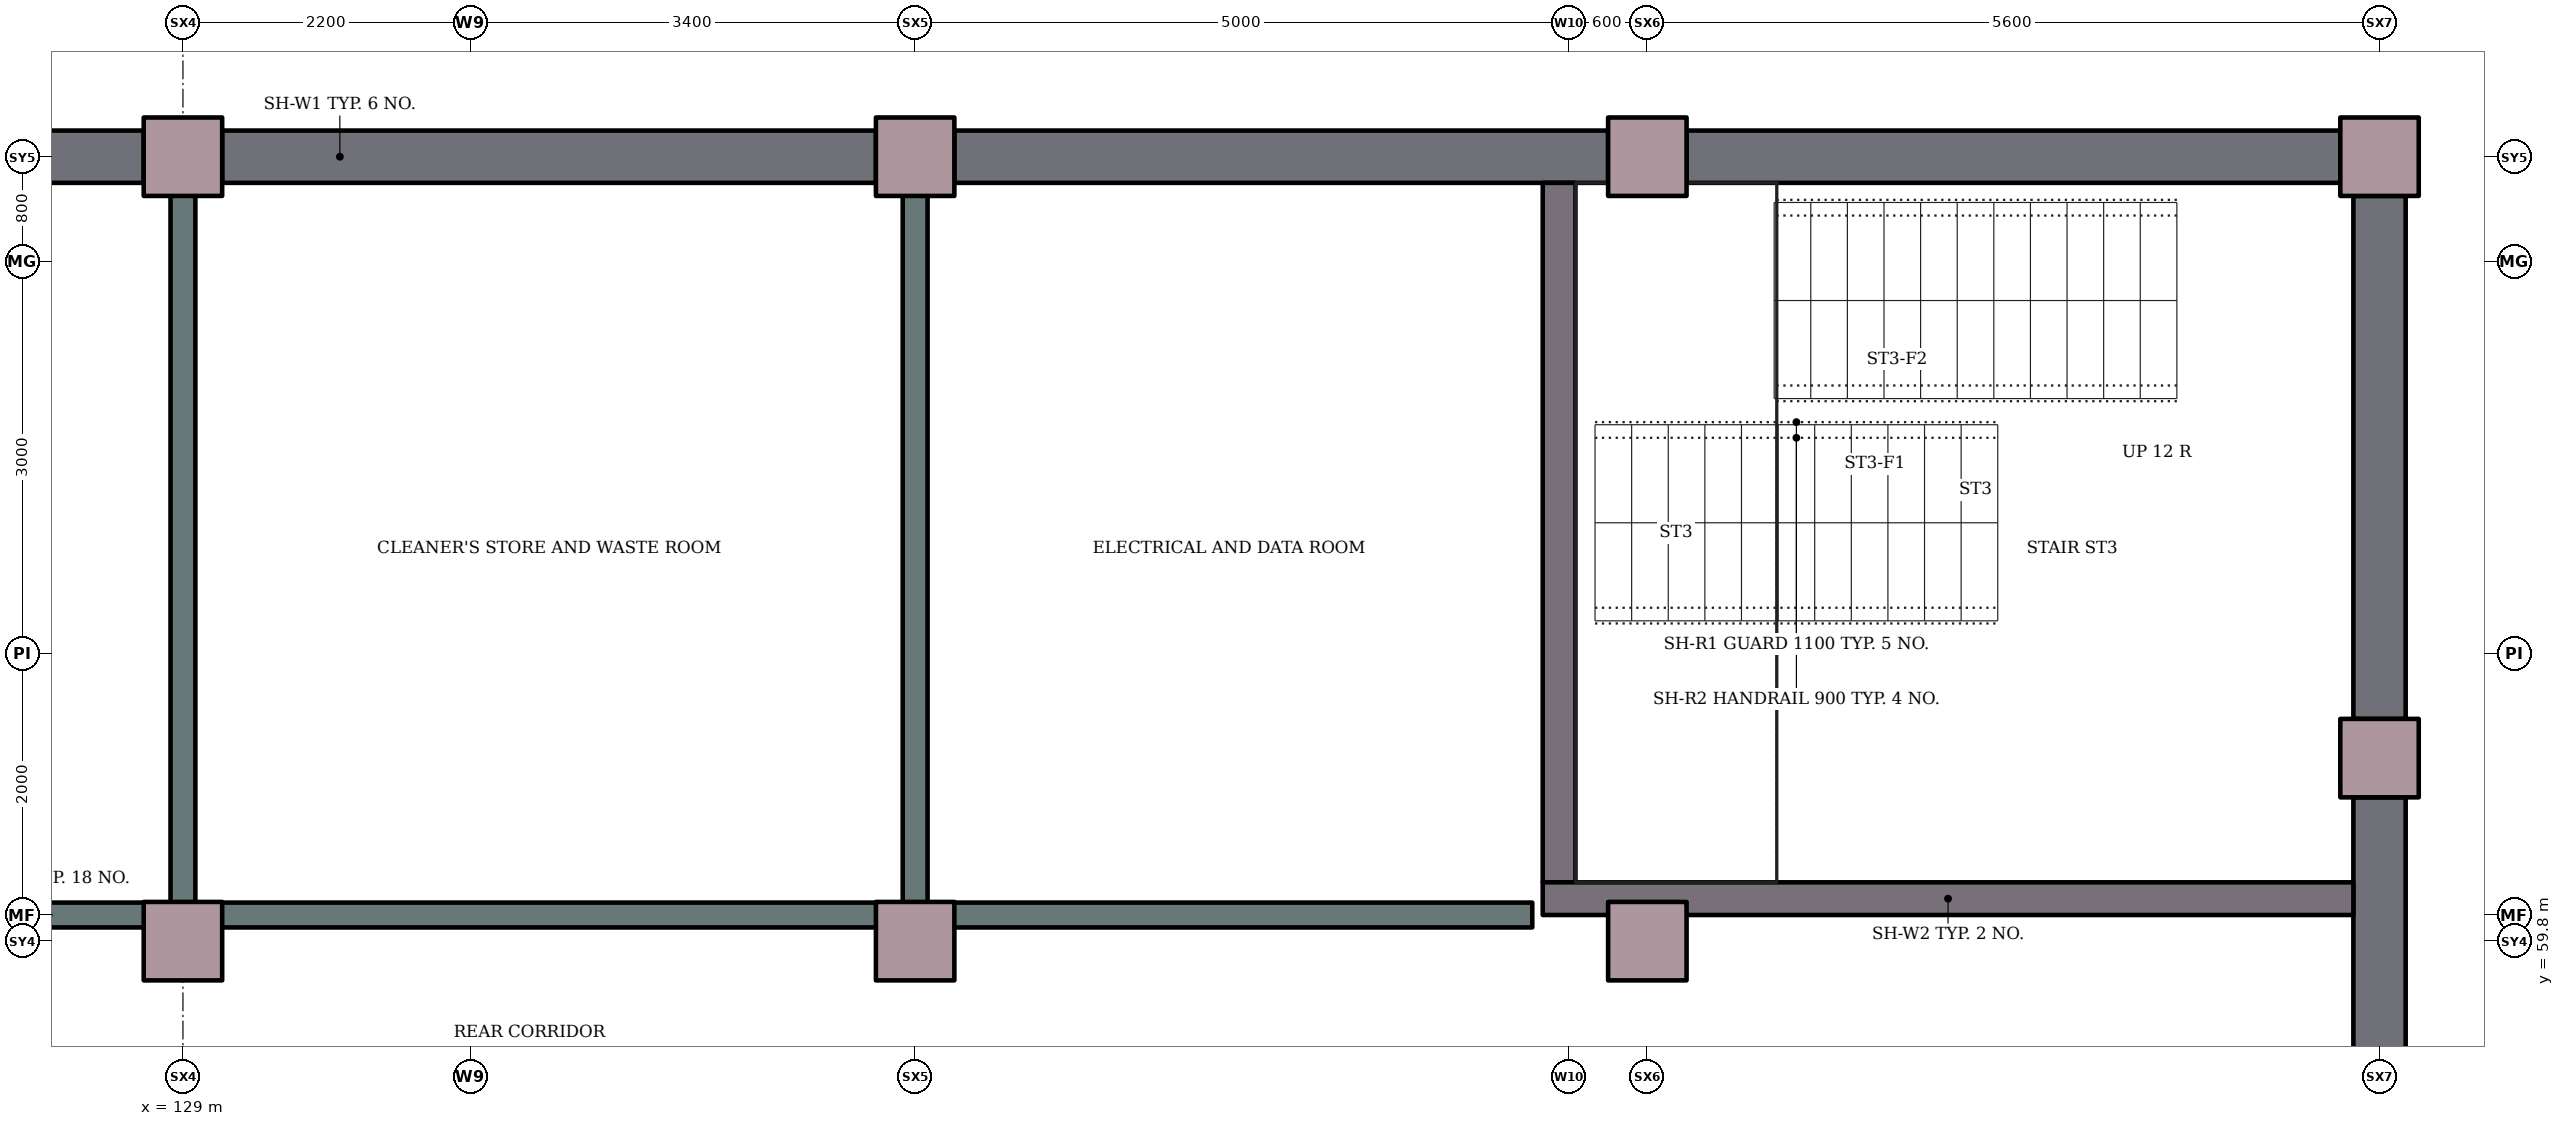
"""IFC4 building model, lengths in metres.
Left out: names, types, materials, properties, quantities, classifications, styles, units other than length and angle.
Written with IfcOpenShell. Run it as: python <this file> out.ifc"""

import sys

from ifc_helpers import new_model, si_unit, direction, frame, frame_2d, origin, origin_2d, place, context, subcontext, project, spatial, rectangle, extrude, element, fill, save


model = new_model("IFC4")
c1 = context("Model", 3, precision=1e-05, world=origin(), true_north=direction((0.0, 1.0)))
c2 = subcontext(c1, "Body", "Model", "MODEL_VIEW")
j1 = project(units=[si_unit("LENGTHUNIT", "METRE"), si_unit("PLANEANGLEUNIT", "RADIAN")], contexts=[c1])
p1 = place(None, origin())
s1 = spatial("IfcSite", under=j1, at=p1, CompositionType="ELEMENT")
p2 = place(p1, origin())
s2 = spatial("IfcBuilding", under=s1, at=p2, CompositionType="ELEMENT")
p3 = place(p2, origin())
s3 = spatial("IfcBuildingStorey", under=s2, at=p3, CompositionType="ELEMENT", Elevation=0.0)
for number, where, z_axis, x_axis in (
    (1, (129.0, 65.8, 0.0), (0.0, 0.0, 1.0), (1.0, 0.0, 0.0)),
    (2, (134.6, 65.8, 0.0), (0.0, 0.0, 1.0), (1.0, 0.0, 0.0)),
    (3, (140.2, 65.8, 0.0), (0.0, 0.0, 1.0), (1.0, 0.0, 0.0)),
    (4, (145.8, 65.8, 0.0), (0.0, 0.0, 1.0), (1.0, 0.0, 0.0)),
    (5, (145.8, 61.2, 0.0), (0.0, 0.0, 1.0), (1.0, 0.0, 0.0)),
    (6, (129.0, 59.8, 0.0), (0.0, 0.0, 1.0), (1.0, 0.0, 0.0)),
    (7, (134.6, 59.8, 0.0), (0.0, 0.0, 1.0), (1.0, 0.0, 0.0)),
    (8, (140.2, 59.8, 0.0), (0.0, 0.0, 1.0), (1.0, 0.0, 0.0)),
):
    element("IfcColumn", number, at=place(p3, frame(where, z_axis=z_axis, x_axis=x_axis)), inside=s3, PredefinedType="COLUMN", context=c2, shape_type="SweptSolid", body=[
        extrude(rectangle(XDim=0.6, YDim=0.6, at=origin_2d()), origin(), (0.0, 0.0, 1.0), 4.2),
    ])
p4 = place(p3, frame((123.7, 65.8, 0.0), z_axis=(0.0, 0.0, 1.0), x_axis=(1.0, 0.0, 0.0)))
e9 = element("IfcWall", 9, at=p4, inside=s3, PredefinedType="SOLIDWALL", context=c2, shape_type="SweptSolid", body=[
    extrude(rectangle(XDim=5.0, YDim=0.4, at=frame_2d((2.5, 0.0))), origin(), (0.0, 0.0, 1.0), 4.2),
])
p5 = place(p4, frame((1.6, 0.0, 2.4)))
e10 = element("IfcOpeningElement", 10, at=p5, cuts=e9, PredefinedType="OPENING", context=c2, shape_type="SweptSolid", body=[
    extrude(rectangle(XDim=1.8, YDim=0.6, at=frame_2d((0.9, 0.3))), frame((0.0, 0.21, 0.0), z_axis=(0.0, -1.0, 0.0), x_axis=(1.0, 0.0, 0.0)), (0.0, 0.0, 1.0), 0.42),
])
p6 = place(p3, frame((129.3, 65.8, 0.0), z_axis=(0.0, 0.0, 1.0), x_axis=(1.0, 0.0, 0.0)))
e11 = element("IfcWall", 11, at=p6, inside=s3, PredefinedType="SOLIDWALL", context=c2, shape_type="SweptSolid", body=[
    extrude(rectangle(XDim=5.0, YDim=0.4, at=frame_2d((2.5, 0.0))), origin(), (0.0, 0.0, 1.0), 4.2),
])
p7 = place(p6, frame((2.05, 0.0, 2.1)))
e12 = element("IfcOpeningElement", 12, at=p7, cuts=e11, PredefinedType="OPENING", context=c2, shape_type="SweptSolid", body=[
    extrude(rectangle(XDim=0.9, YDim=0.9, at=frame_2d((0.45, 0.45))), frame((0.0, 0.21, 0.0), z_axis=(0.0, -1.0, 0.0), x_axis=(1.0, 0.0, 0.0)), (0.0, 0.0, 1.0), 0.42),
])
p8 = place(p3, frame((134.9, 65.8, 0.0), z_axis=(0.0, 0.0, 1.0), x_axis=(1.0, 0.0, 0.0)))
e13 = element("IfcWall", 13, at=p8, inside=s3, PredefinedType="SOLIDWALL", context=c2, shape_type="SweptSolid", body=[
    extrude(rectangle(XDim=5.0, YDim=0.4, at=frame_2d((2.5, 0.0))), origin(), (0.0, 0.0, 1.0), 4.2),
])
p9 = place(p8, frame((2.05, 0.0, 2.4)))
e14 = element("IfcOpeningElement", 14, at=p9, cuts=e13, PredefinedType="OPENING", context=c2, shape_type="SweptSolid", body=[
    extrude(rectangle(XDim=0.9, YDim=0.6, at=frame_2d((0.45, 0.3))), frame((0.0, 0.21, 0.0), z_axis=(0.0, -1.0, 0.0), x_axis=(1.0, 0.0, 0.0)), (0.0, 0.0, 1.0), 0.42),
])
p10 = place(p3, frame((140.5, 65.8, 0.0), z_axis=(0.0, 0.0, 1.0), x_axis=(1.0, 0.0, 0.0)))
e15 = element("IfcWall", 15, at=p10, inside=s3, PredefinedType="SOLIDWALL", context=c2, shape_type="SweptSolid", body=[
    extrude(rectangle(XDim=5.0, YDim=0.4, at=frame_2d((2.5, 0.0))), origin(), (0.0, 0.0, 1.0), 4.2),
])
p11 = place(p10, frame((3.85, 0.0, 0.0)))
e16 = element("IfcOpeningElement", 16, at=p11, cuts=e15, PredefinedType="OPENING", context=c2, shape_type="SweptSolid", body=[
    extrude(rectangle(XDim=1.0, YDim=2.4, at=frame_2d((0.5, 1.2))), frame((0.0, 0.21, 0.0), z_axis=(0.0, -1.0, 0.0), x_axis=(1.0, 0.0, 0.0)), (0.0, 0.0, 1.0), 0.42),
])
p12 = place(p3, frame((145.8, 56.9, 0.0), z_axis=(0.0, 0.0, 1.0), x_axis=(0.0, 1.0, 0.0)))
e17 = element("IfcWall", 17, at=p12, inside=s3, PredefinedType="SOLIDWALL", context=c2, shape_type="SweptSolid", body=[
    extrude(rectangle(XDim=4.0, YDim=0.4, at=frame_2d((2.0, 0.0))), origin(), (0.0, 0.0, 1.0), 4.2),
])
p13 = place(p12, frame((1.4, 0.0, 1.2)))
e18 = element("IfcOpeningElement", 18, at=p13, cuts=e17, PredefinedType="OPENING", context=c2, shape_type="SweptSolid", body=[
    extrude(rectangle(XDim=1.2, YDim=1.8, at=frame_2d((0.6, 0.9))), frame((0.0, 0.21, 0.0), z_axis=(0.0, -1.0, 0.0), x_axis=(1.0, 0.0, 0.0)), (0.0, 0.0, 1.0), 0.42),
])
p14 = place(p3, frame((145.8, 61.5, 0.0), z_axis=(0.0, 0.0, 1.0), x_axis=(0.0, 1.0, 0.0)))
e19 = element("IfcWall", 19, at=p14, inside=s3, PredefinedType="SOLIDWALL", context=c2, shape_type="SweptSolid", body=[
    extrude(rectangle(XDim=4.0, YDim=0.4, at=frame_2d((2.0, 0.0))), origin(), (0.0, 0.0, 1.0), 4.2),
])
p15 = place(p14, frame((1.55, 0.0, 0.9)))
e20 = element("IfcOpeningElement", 20, at=p15, cuts=e19, PredefinedType="OPENING", context=c2, shape_type="SweptSolid", body=[
    extrude(rectangle(XDim=0.9, YDim=1.5, at=frame_2d((0.45, 0.75))), frame((0.0, 0.21, 0.0), z_axis=(0.0, -1.0, 0.0), x_axis=(1.0, 0.0, 0.0)), (0.0, 0.0, 1.0), 0.42),
])
p16 = place(p3, frame((139.525, 60.25, 0.0), z_axis=(0.0, 0.0, 1.0), x_axis=(0.0, 1.0, 0.0)))
e21 = element("IfcWall", 21, at=p16, inside=s3, PredefinedType="SHEAR", context=c2, shape_type="SweptSolid", body=[
    extrude(rectangle(XDim=5.35, YDim=0.25, at=frame_2d((2.675, 0.0))), origin(), (0.0, 0.0, 1.0), 4.2),
])
p17 = place(p3, frame((139.4, 60.125, 0.0), z_axis=(0.0, 0.0, 1.0), x_axis=(1.0, 0.0, 0.0)))
e22 = element("IfcWall", 22, at=p17, inside=s3, PredefinedType="SHEAR", context=c2, shape_type="SweptSolid", body=[
    extrude(rectangle(XDim=6.2, YDim=0.25, at=frame_2d((3.1, 0.0))), origin(), (0.0, 0.0, 1.0), 4.2),
])
p18 = place(p17, frame((4.25, 0.0, 0.0)))
e23 = element("IfcOpeningElement", 23, at=p18, cuts=e22, PredefinedType="OPENING", context=c2, shape_type="SweptSolid", body=[
    extrude(rectangle(XDim=1.0, YDim=2.1, at=frame_2d((0.5, 1.05))), frame((0.0, 0.135, 0.0), z_axis=(0.0, -1.0, 0.0), x_axis=(1.0, 0.0, 0.0)), (0.0, 0.0, 1.0), 0.27),
])
p19 = place(p3, frame((129.0, 60.0, 0.0), z_axis=(0.0, 0.0, 1.0), x_axis=(-1.0, 0.0, 0.0)))
e24 = element("IfcWall", 24, at=p19, inside=s3, PredefinedType="PARTITIONING", context=c2, shape_type="SweptSolid", body=[
    extrude(rectangle(XDim=5.705, YDim=0.19, at=frame_2d((2.853, 0.0))), origin(), (0.0, 0.0, 1.0), 3.9),
])
p20 = place(p19, frame((2.15, 0.0, 0.0)))
e25 = element("IfcOpeningElement", 25, at=p20, cuts=e24, PredefinedType="OPENING", context=c2, shape_type="SweptSolid", body=[
    extrude(rectangle(XDim=1.5, YDim=2.1, at=frame_2d((0.75, 1.05))), frame((0.0, 0.105, 0.0), z_axis=(0.0, -1.0, 0.0), x_axis=(1.0, 0.0, 0.0)), (0.0, 0.0, 1.0), 0.21),
])
p21 = place(p3, frame((129.0, 60.095, 0.0), z_axis=(0.0, 0.0, 1.0), x_axis=(0.0, 1.0, 0.0)))
e26 = element("IfcWall", 26, at=p21, inside=s3, PredefinedType="PARTITIONING", context=c2, shape_type="SweptSolid", body=[
    extrude(rectangle(XDim=5.505, YDim=0.19, at=frame_2d((2.752, 0.0))), origin(), (0.0, 0.0, 1.0), 3.9),
])
p22 = place(p3, frame((134.6, 60.0, 0.0), z_axis=(0.0, 0.0, 1.0), x_axis=(-1.0, 0.0, 0.0)))
e27 = element("IfcWall", 27, at=p22, inside=s3, PredefinedType="PARTITIONING", context=c2, shape_type="SweptSolid", body=[
    extrude(rectangle(XDim=5.505, YDim=0.19, at=frame_2d((2.752, 0.0))), origin(), (0.0, 0.0, 1.0), 3.9),
])
p23 = place(p22, frame((2.45, 0.0, 0.0)))
e28 = element("IfcOpeningElement", 28, at=p23, cuts=e27, PredefinedType="OPENING", context=c2, shape_type="SweptSolid", body=[
    extrude(rectangle(XDim=0.8, YDim=2.1, at=frame_2d((0.4, 1.05))), frame((0.0, 0.105, 0.0), z_axis=(0.0, -1.0, 0.0), x_axis=(1.0, 0.0, 0.0)), (0.0, 0.0, 1.0), 0.21),
])
p24 = place(p3, frame((134.6, 60.095, 0.0), z_axis=(0.0, 0.0, 1.0), x_axis=(0.0, 1.0, 0.0)))
e29 = element("IfcWall", 29, at=p24, inside=s3, PredefinedType="PARTITIONING", context=c2, shape_type="SweptSolid", body=[
    extrude(rectangle(XDim=5.505, YDim=0.19, at=frame_2d((2.752, 0.0))), origin(), (0.0, 0.0, 1.0), 3.9),
])
p25 = place(p3, frame((139.32, 60.0, 0.0), z_axis=(0.0, 0.0, 1.0), x_axis=(-1.0, 0.0, 0.0)))
e30 = element("IfcWall", 30, at=p25, inside=s3, PredefinedType="PARTITIONING", context=c2, shape_type="SweptSolid", body=[
    extrude(rectangle(XDim=4.625, YDim=0.19, at=frame_2d((2.312, 0.0))), origin(), (0.0, 0.0, 1.0), 3.9),
])
p26 = place(p25, frame((1.57, 0.0, 0.0)))
e31 = element("IfcOpeningElement", 31, at=p26, cuts=e30, PredefinedType="OPENING", context=c2, shape_type="SweptSolid", body=[
    extrude(rectangle(XDim=1.5, YDim=2.1, at=frame_2d((0.75, 1.05))), frame((0.0, 0.105, 0.0), z_axis=(0.0, -1.0, 0.0), x_axis=(1.0, 0.0, 0.0)), (0.0, 0.0, 1.0), 0.21),
])
for number, where, z_axis, x_axis in (
    (32, (140.42, 65.6, 0.0), (0.0, 0.0, 1.0), (-1.0, 0.0, 0.0)),
    (33, (145.6, 60.98, 0.0), (0.0, 0.0, 1.0), (0.0, 1.0, 0.0)),
):
    element("IfcWall", number, at=place(p3, frame(where, z_axis=z_axis, x_axis=x_axis)), inside=s3, PredefinedType="PARTITIONING", context=c2, shape_type="SweptSolid", body=[
        extrude(rectangle(XDim=0.44, YDim=0.19, at=frame_2d((0.22, 0.0))), origin(), (0.0, 0.0, 1.0), 3.9),
    ])
p27 = place(p11, origin())
e34 = element("IfcDoor", 34, at=p27, inside=s3, OperationType="SINGLE_SWING_LEFT", PredefinedType="DOOR", context=c2, shape_type="SweptSolid", body=[
    extrude(rectangle(XDim=1.0, YDim=2.4, at=frame_2d((0.5, 1.2))), frame((0.0, 0.025, 0.0), z_axis=(0.0, -1.0, 0.0), x_axis=(1.0, 0.0, 0.0)), (0.0, 0.0, 1.0), 0.05),
])
fill(e16, e34)
p28 = place(p7, origin())
e35 = element("IfcWindow", 35, at=p28, inside=s3, PartitioningType="SINGLE_PANEL", PredefinedType="WINDOW", context=c2, shape_type="SweptSolid", body=[
    extrude(rectangle(XDim=0.9, YDim=0.9, at=frame_2d((0.45, 0.45))), frame((0.0, 0.03, 0.0), z_axis=(0.0, -1.0, 0.0), x_axis=(1.0, 0.0, 0.0)), (0.0, 0.0, 1.0), 0.06),
])
fill(e12, e35)
p29 = place(p9, origin())
e36 = element("IfcWindow", 36, at=p29, inside=s3, PartitioningType="SINGLE_PANEL", PredefinedType="WINDOW", context=c2, shape_type="SweptSolid", body=[
    extrude(rectangle(XDim=0.9, YDim=0.6, at=frame_2d((0.45, 0.3))), frame((0.0, 0.03, 0.0), z_axis=(0.0, -1.0, 0.0), x_axis=(1.0, 0.0, 0.0)), (0.0, 0.0, 1.0), 0.06),
])
fill(e14, e36)
p30 = place(p15, origin())
e37 = element("IfcWindow", 37, at=p30, inside=s3, PartitioningType="SINGLE_PANEL", PredefinedType="WINDOW", context=c2, shape_type="SweptSolid", body=[
    extrude(rectangle(XDim=0.9, YDim=1.5, at=frame_2d((0.45, 0.75))), frame((0.0, 0.03, 0.0), z_axis=(0.0, -1.0, 0.0), x_axis=(1.0, 0.0, 0.0)), (0.0, 0.0, 1.0), 0.06),
])
fill(e20, e37)
p31 = place(p13, origin())
e38 = element("IfcWindow", 38, at=p31, inside=s3, PartitioningType="SINGLE_PANEL", PredefinedType="WINDOW", context=c2, shape_type="SweptSolid", body=[
    extrude(rectangle(XDim=1.2, YDim=1.8, at=frame_2d((0.6, 0.9))), frame((0.0, 0.03, 0.0), z_axis=(0.0, -1.0, 0.0), x_axis=(1.0, 0.0, 0.0)), (0.0, 0.0, 1.0), 0.06),
])
fill(e18, e38)
p32 = place(p18, origin())
e39 = element("IfcDoor", 39, at=p32, inside=s3, OperationType="SINGLE_SWING_LEFT", PredefinedType="DOOR", context=c2, shape_type="SweptSolid", body=[
    extrude(rectangle(XDim=1.0, YDim=2.1, at=frame_2d((0.5, 1.05))), frame((0.0, 0.025, 0.0), z_axis=(0.0, -1.0, 0.0), x_axis=(1.0, 0.0, 0.0)), (0.0, 0.0, 1.0), 0.05),
])
fill(e23, e39)
p33 = place(p23, origin())
e40 = element("IfcDoor", 40, at=p33, inside=s3, OperationType="SINGLE_SWING_LEFT", PredefinedType="DOOR", context=c2, shape_type="SweptSolid", body=[
    extrude(rectangle(XDim=0.8, YDim=2.1, at=frame_2d((0.4, 1.05))), frame((0.0, 0.025, 0.0), z_axis=(0.0, -1.0, 0.0), x_axis=(1.0, 0.0, 0.0)), (0.0, 0.0, 1.0), 0.05),
])
fill(e28, e40)
p34 = place(p26, origin())
e41 = element("IfcDoor", 41, at=p34, inside=s3, OperationType="DOUBLE_DOOR_SINGLE_SWING", PredefinedType="DOOR", context=c2, shape_type="SweptSolid", body=[
    extrude(rectangle(XDim=1.5, YDim=2.1, at=frame_2d((0.75, 1.05))), frame((0.0, 0.025, 0.0), z_axis=(0.0, -1.0, 0.0), x_axis=(1.0, 0.0, 0.0)), (0.0, 0.0, 1.0), 0.05),
])
fill(e31, e41)
save(model, sys.argv[1])
